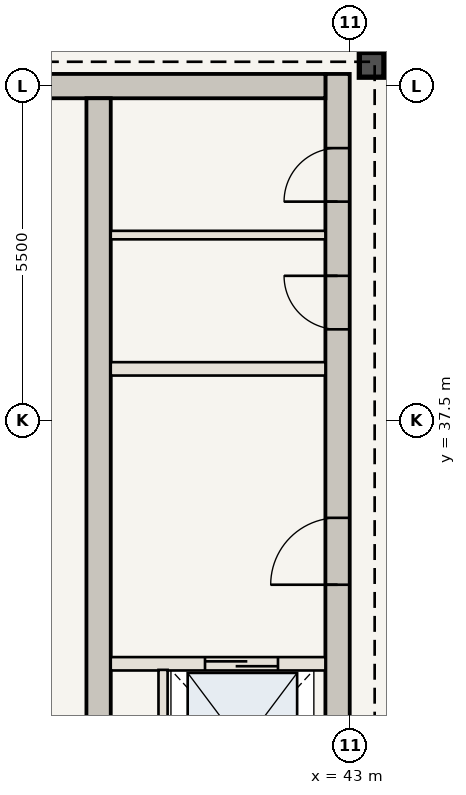
"""IFC4 building model, lengths in metres.
Left out: names, types, materials, properties, quantities, classifications, styles, units other than length and angle.
Written with IfcOpenShell. Run it as: python <this file> out.ifc"""

import sys

from ifc_helpers import new_model, si_unit, direction, frame, frame_2d, origin, origin_2d, place, context, subcontext, project, spatial, rectangle, i_section, extrude, element, fill, save


model = new_model("IFC4")
c1 = context("Model", 3, precision=1e-05, world=origin(), true_north=direction((0.0, 1.0)))
c2 = subcontext(c1, "Body", "Model", "MODEL_VIEW")
j1 = project(units=[si_unit("LENGTHUNIT", "METRE"), si_unit("PLANEANGLEUNIT", "RADIAN")], contexts=[c1])
p1 = place(None, origin())
s1 = spatial("IfcSite", under=j1, at=p1, CompositionType="ELEMENT")
p2 = place(p1, origin())
s2 = spatial("IfcBuilding", under=s1, at=p2, CompositionType="ELEMENT")
p3 = place(p2, frame((0.0, 0.0, 317.8)))
s3 = spatial("IfcBuildingStorey", under=s2, at=p3, CompositionType="ELEMENT", Elevation=317.8)
p4 = place(p3, frame((42.79, 30.6, 0.0), z_axis=(0.0, 0.0, 1.0), x_axis=(0.0, 1.0, 0.0)))
e1 = element("IfcWall", 1, at=p4, inside=s3, PredefinedType="SHEAR", context=c2, shape_type="SweptSolid", body=[
    extrude(rectangle(XDim=12.6, YDim=0.4, at=frame_2d((6.3, 0.0))), origin(), (0.0, 0.0, 1.0), 4.55),
])
p5 = place(p4, frame((4.2, 0.0, 0.0)))
e2 = element("IfcOpeningElement", 2, at=p5, cuts=e1, PredefinedType="OPENING", context=c2, shape_type="SweptSolid", body=[
    extrude(rectangle(XDim=1.1, YDim=2.15, at=frame_2d((0.55, 1.075))), frame((0.0, 0.21, 0.0), z_axis=(0.0, -1.0, 0.0), x_axis=(1.0, 0.0, 0.0)), (0.0, 0.0, 1.0), 0.42),
])
p6 = place(p4, frame((8.4, 0.0, 0.0)))
e3 = element("IfcOpeningElement", 3, at=p6, cuts=e1, PredefinedType="OPENING", context=c2, shape_type="SweptSolid", body=[
    extrude(rectangle(XDim=0.88, YDim=2.1, at=frame_2d((0.44, 1.05))), frame((0.0, 0.21, 0.0), z_axis=(0.0, -1.0, 0.0), x_axis=(1.0, 0.0, 0.0)), (0.0, 0.0, 1.0), 0.42),
])
p7 = place(p4, frame((10.5, 0.0, 0.0)))
e4 = element("IfcOpeningElement", 4, at=p7, cuts=e1, PredefinedType="OPENING", context=c2, shape_type="SweptSolid", body=[
    extrude(rectangle(XDim=0.88, YDim=2.1, at=frame_2d((0.44, 1.05))), frame((0.0, 0.21, 0.0), z_axis=(0.0, -1.0, 0.0), x_axis=(1.0, 0.0, 0.0)), (0.0, 0.0, 1.0), 0.42),
])
p8 = place(p3, frame((37.75, 43.0, 0.0), z_axis=(0.0, 0.0, 1.0), x_axis=(1.0, 0.0, 0.0)))
e5 = element("IfcWall", 5, at=p8, inside=s3, PredefinedType="SHEAR", context=c2, shape_type="SweptSolid", body=[
    extrude(rectangle(XDim=4.84, YDim=0.4, at=frame_2d((2.42, 0.0))), origin(), (0.0, 0.0, 1.0), 4.55),
])
p9 = place(p3, frame((38.86, 30.6, 0.0), z_axis=(0.0, 0.0, 1.0), x_axis=(0.0, 1.0, 0.0)))
e6 = element("IfcWall", 6, at=p9, inside=s3, PredefinedType="SHEAR", context=c2, shape_type="SweptSolid", body=[
    extrude(rectangle(XDim=12.2, YDim=0.4, at=frame_2d((6.1, 0.0))), origin(), (0.0, 0.0, 1.0), 4.55),
])
p10 = place(p3, frame((43.35, 43.35, 0.0), z_axis=(0.0, 0.0, 1.0), x_axis=(1.0, 0.0, 0.0)))
e7 = element("IfcColumn", 7, at=p10, inside=s3, PredefinedType="COLUMN", context=c2, shape_type="SweptSolid", body=[
    extrude(i_section(OverallWidth=0.404, OverallDepth=0.407, WebThickness=0.027, FlangeThickness=0.044, at=origin_2d()), origin(), (0.0, 0.0, 1.0), 4.55),
])
p11 = place(p3, frame((39.06, 33.5, 0.0), z_axis=(0.0, 0.0, 1.0), x_axis=(1.0, 0.0, 0.0)))
e8 = element("IfcWall", 8, at=p11, inside=s3, PredefinedType="STANDARD", context=c2, shape_type="SweptSolid", body=[
    extrude(rectangle(XDim=3.53, YDim=0.22, at=frame_2d((1.765, 0.0))), origin(), (0.0, 0.0, 1.0), 4.29),
])
p12 = place(p11, frame((1.55, 0.0, 0.0)))
e9 = element("IfcOpeningElement", 9, at=p12, cuts=e8, PredefinedType="OPENING", context=c2, shape_type="SweptSolid", body=[
    extrude(rectangle(XDim=1.2, YDim=2.2, at=frame_2d((0.6, 1.1))), frame((0.0, 0.12, 0.0), z_axis=(0.0, -1.0, 0.0), x_axis=(1.0, 0.0, 0.0)), (0.0, 0.0, 1.0), 0.24),
])
p13 = place(p3, frame((39.92, 30.75, 0.0), z_axis=(0.0, 0.0, 1.0), x_axis=(0.0, 1.0, 0.0)))
e10 = element("IfcWall", 10, at=p13, inside=s3, PredefinedType="STANDARD", context=c2, shape_type="SweptSolid", body=[
    extrude(rectangle(XDim=2.65, YDim=0.15, at=frame_2d((1.325, 0.0))), origin(), (0.0, 0.0, 1.0), 4.29),
])
p14 = place(p3, frame((39.06, 38.35, 0.0), z_axis=(0.0, 0.0, 1.0), x_axis=(1.0, 0.0, 0.0)))
e11 = element("IfcWall", 11, at=p14, inside=s3, PredefinedType="STANDARD", context=c2, shape_type="SweptSolid", body=[
    extrude(rectangle(XDim=3.53, YDim=0.22, at=frame_2d((1.765, 0.0))), origin(), (0.0, 0.0, 1.0), 4.29),
])
p15 = place(p3, frame((39.06, 40.55, 0.0), z_axis=(0.0, 0.0, 1.0), x_axis=(1.0, 0.0, 0.0)))
e12 = element("IfcWall", 12, at=p15, inside=s3, PredefinedType="STANDARD", context=c2, shape_type="SweptSolid", body=[
    extrude(rectangle(XDim=3.53, YDim=0.14, at=frame_2d((1.765, 0.0))), origin(), (0.0, 0.0, 1.0), 4.29),
])
p16 = place(p5, origin())
e13 = element("IfcDoor", 13, at=p16, inside=s3, OperationType="SINGLE_SWING_LEFT", PredefinedType="DOOR", context=c2, shape_type="SweptSolid", body=[
    extrude(rectangle(XDim=1.1, YDim=2.15, at=frame_2d((0.55, 1.075))), frame((0.0, 0.025, 0.0), z_axis=(0.0, -1.0, 0.0), x_axis=(1.0, 0.0, 0.0)), (0.0, 0.0, 1.0), 0.05),
])
fill(e2, e13)
p17 = place(p6, origin())
e14 = element("IfcDoor", 14, at=p17, inside=s3, OperationType="SINGLE_SWING_RIGHT", PredefinedType="DOOR", context=c2, shape_type="SweptSolid", body=[
    extrude(rectangle(XDim=0.88, YDim=2.1, at=frame_2d((0.44, 1.05))), frame((0.0, 0.025, 0.0), z_axis=(0.0, -1.0, 0.0), x_axis=(1.0, 0.0, 0.0)), (0.0, 0.0, 1.0), 0.05),
])
fill(e3, e14)
p18 = place(p7, origin())
e15 = element("IfcDoor", 15, at=p18, inside=s3, OperationType="SINGLE_SWING_LEFT", PredefinedType="DOOR", context=c2, shape_type="SweptSolid", body=[
    extrude(rectangle(XDim=0.88, YDim=2.1, at=frame_2d((0.44, 1.05))), frame((0.0, 0.025, 0.0), z_axis=(0.0, -1.0, 0.0), x_axis=(1.0, 0.0, 0.0)), (0.0, 0.0, 1.0), 0.05),
])
fill(e4, e15)
p19 = place(p12, origin())
e16 = element("IfcDoor", 16, at=p19, inside=s3, OperationType="DOUBLE_DOOR_SLIDING", PredefinedType="DOOR", context=c2, shape_type="SweptSolid", body=[
    extrude(rectangle(XDim=1.2, YDim=2.2, at=frame_2d((0.6, 1.1))), frame((0.0, 0.025, 0.0), z_axis=(0.0, -1.0, 0.0), x_axis=(1.0, 0.0, 0.0)), (0.0, 0.0, 1.0), 0.05),
])
fill(e9, e16)
save(model, sys.argv[1])
